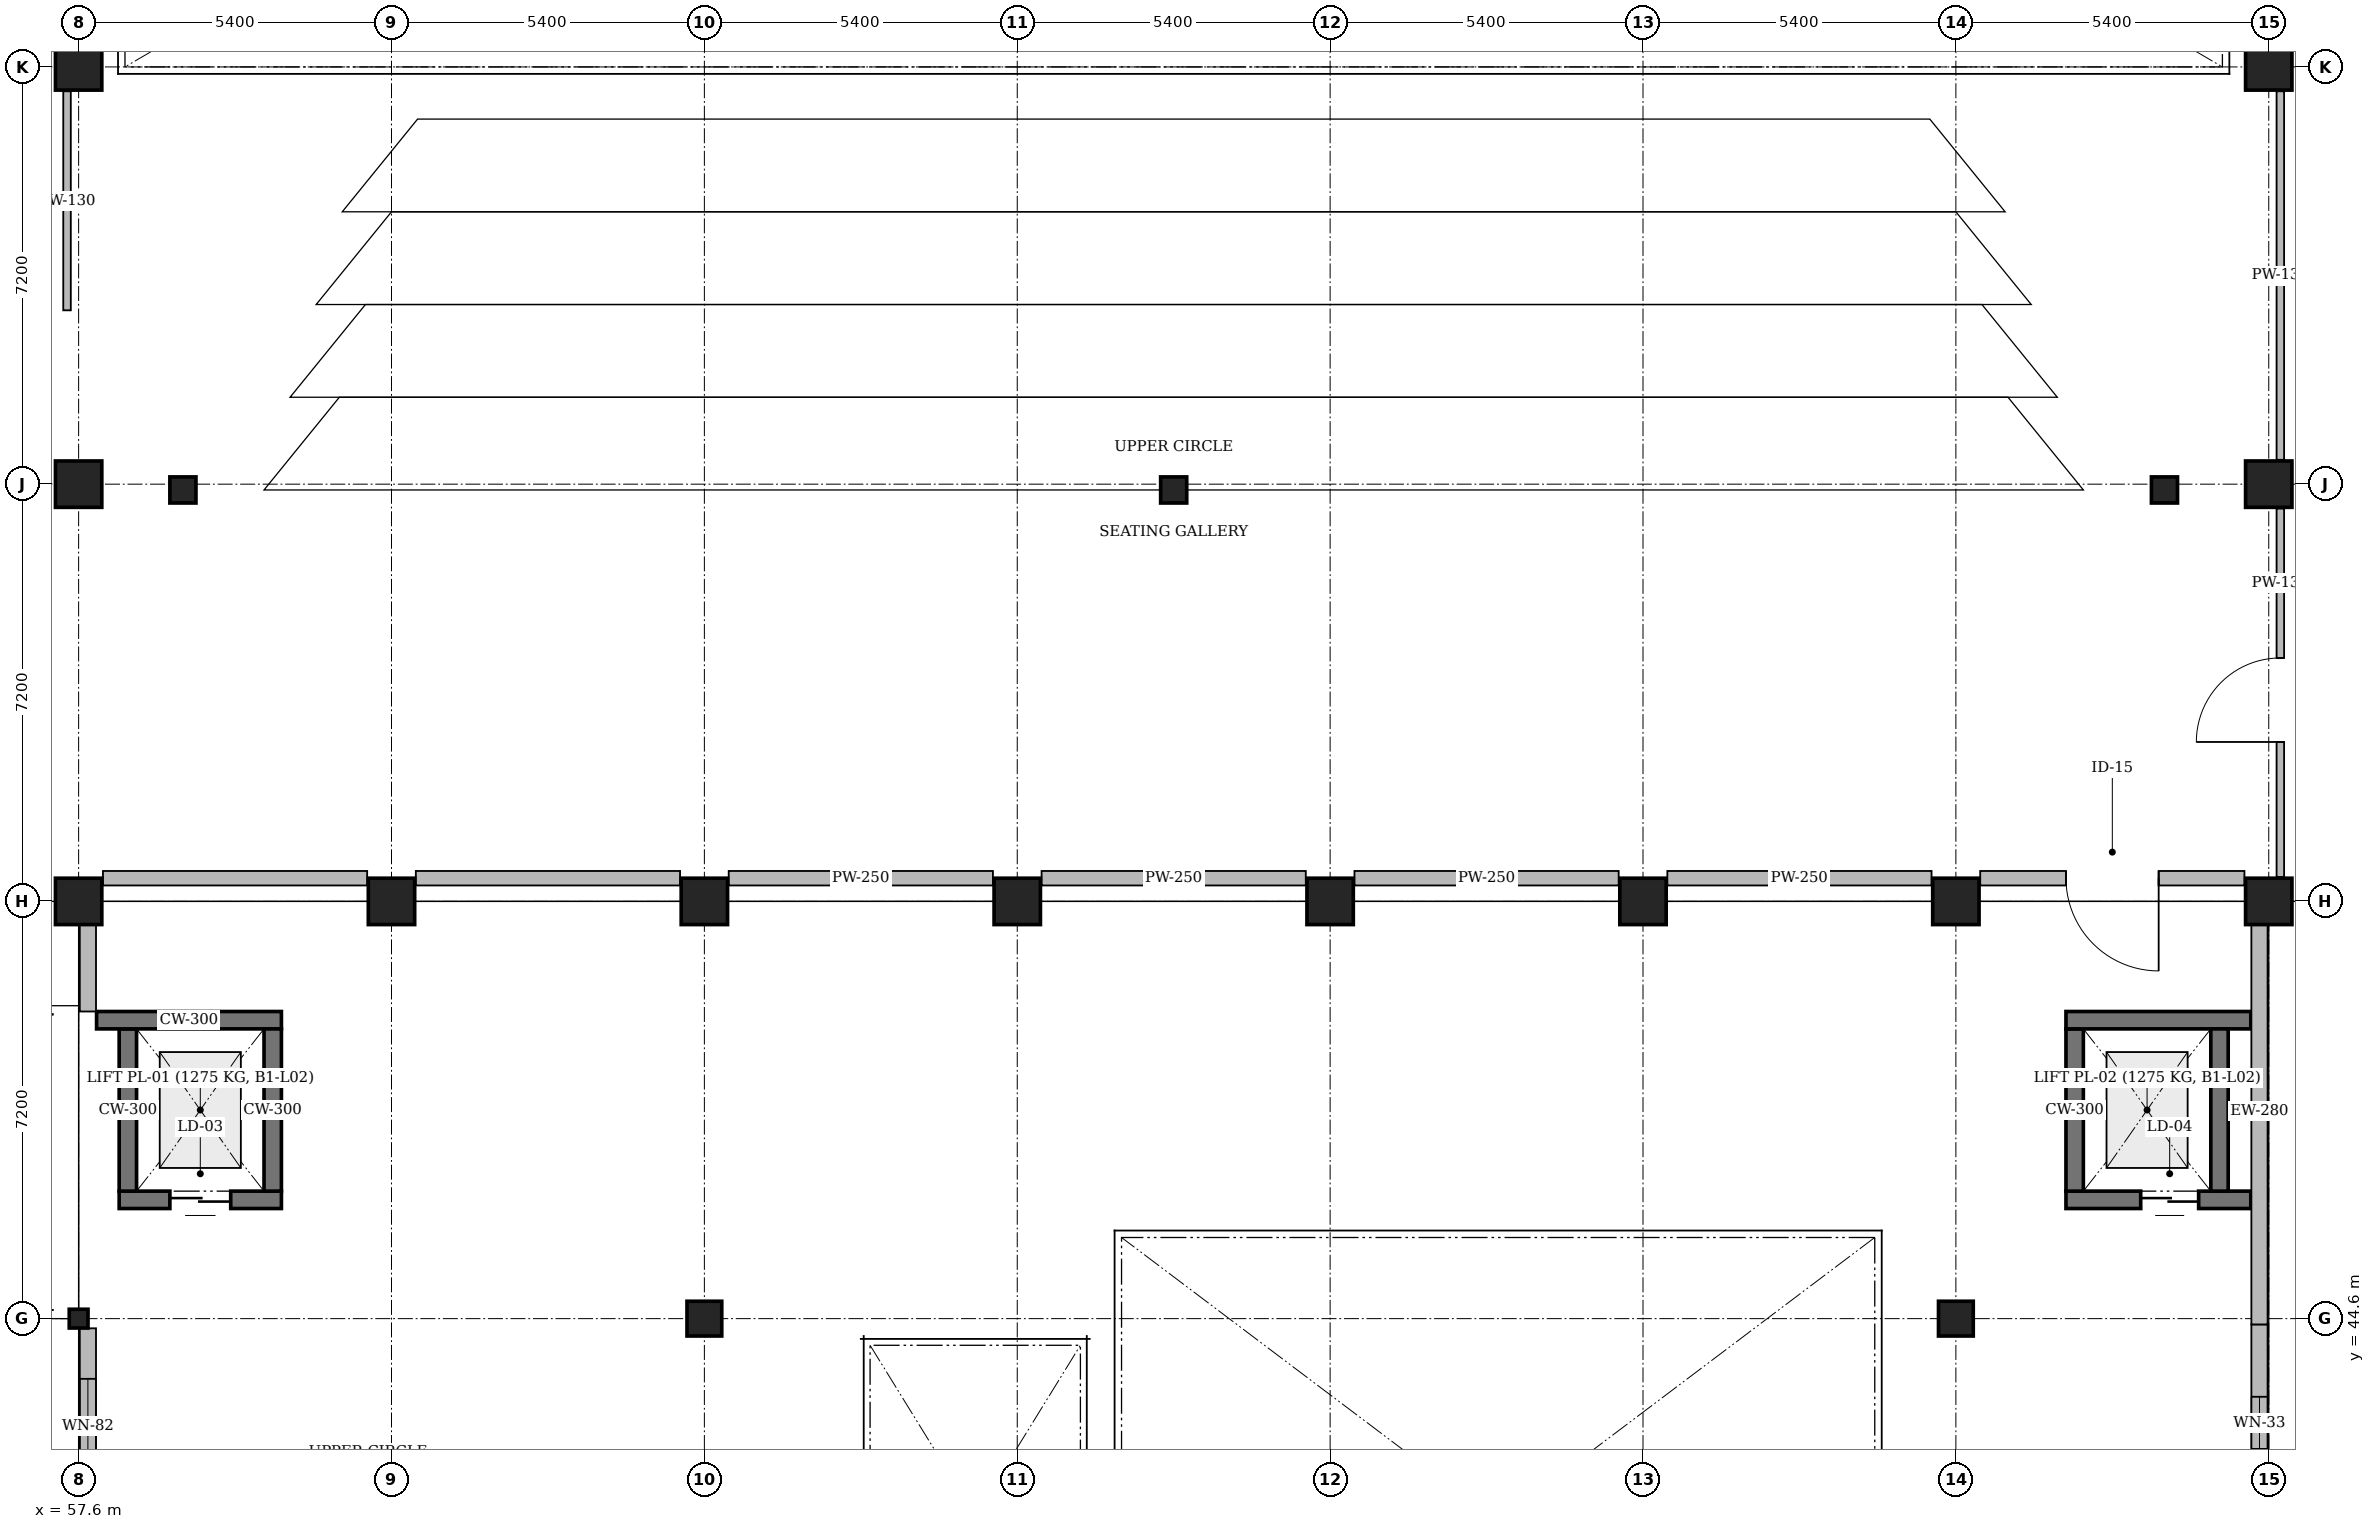
"""IFC4 building model, lengths in metres.
Left out: names, types, materials, properties, quantities, classifications, styles, units other than length and angle.
Written with IfcOpenShell. Run it as: python <this file> out.ifc"""

import sys

from ifc_helpers import new_model, si_unit, direction, frame, frame_2d, origin, origin_2d, place, context, subcontext, project, spatial, rectangle, circle, hollow_circle, extrude, element, fill, save


model = new_model("IFC4")
c1 = context("Model", 3, precision=1e-05, world=origin(), true_north=direction((0.0, 1.0)))
c2 = subcontext(c1, "Body", "Model", "MODEL_VIEW")
j1 = project(units=[si_unit("LENGTHUNIT", "METRE"), si_unit("PLANEANGLEUNIT", "RADIAN")], contexts=[c1])
p1 = place(None, origin())
s1 = spatial("IfcSite", under=j1, at=p1, CompositionType="ELEMENT")
p2 = place(p1, origin())
s2 = spatial("IfcBuilding", under=s1, at=p2, CompositionType="ELEMENT")
p3 = place(p2, frame((0.0, 0.0, 9.0)))
s3 = spatial("IfcBuildingStorey", under=s2, at=p3, CompositionType="ELEMENT", Elevation=9.0)
p4 = place(p3, frame((68.4, 44.6, 0.0), z_axis=(0.0, 0.0, 1.0), x_axis=(1.0, 0.0, 0.0)))
e1 = element("IfcColumn", 1, at=p4, inside=s3, PredefinedType="COLUMN", context=c2, shape_type="SweptSolid", body=[
    extrude(circle(Radius=0.3, at=origin_2d()), origin(), (0.0, 0.0, 1.0), 4.2),
])
for number, where, z_axis, x_axis in (
    (2, (68.4, 51.8, 0.0), (0.0, 0.0, 1.0), (1.0, 0.0, 0.0)),
    (3, (73.8, 51.8, 0.0), (0.0, 0.0, 1.0), (1.0, 0.0, 0.0)),
    (4, (79.2, 51.8, 0.0), (0.0, 0.0, 1.0), (1.0, 0.0, 0.0)),
    (5, (84.6, 51.8, 0.0), (0.0, 0.0, 1.0), (1.0, 0.0, 0.0)),
):
    element("IfcColumn", number, at=place(p3, frame(where, z_axis=z_axis, x_axis=x_axis)), inside=s3, PredefinedType="COLUMN", context=c2, shape_type="SweptSolid", body=[
        extrude(rectangle(XDim=0.8, YDim=0.8, at=origin_2d()), origin(), (0.0, 0.0, 1.0), 4.2),
    ])
p5 = place(p3, frame((90.0, 44.6, 0.0), z_axis=(0.0, 0.0, 1.0), x_axis=(1.0, 0.0, 0.0)))
e6 = element("IfcColumn", 6, at=p5, inside=s3, PredefinedType="COLUMN", context=c2, shape_type="SweptSolid", body=[
    extrude(circle(Radius=0.3, at=origin_2d()), origin(), (0.0, 0.0, 1.0), 4.2),
])
for number, where, z_axis, x_axis in (
    (7, (90.0, 51.8, 0.0), (0.0, 0.0, 1.0), (1.0, 0.0, 0.0)),
    (8, (95.4, 51.8, 0.0), (0.0, 0.0, 1.0), (1.0, 0.0, 0.0)),
    (9, (95.4, 59.0, 0.0), (0.0, 0.0, 1.0), (1.0, 0.0, 0.0)),
    (10, (95.4, 66.2, 0.0), (0.0, 0.0, 1.0), (1.0, 0.0, 0.0)),
):
    element("IfcColumn", number, at=place(p3, frame(where, z_axis=z_axis, x_axis=x_axis)), inside=s3, PredefinedType="COLUMN", context=c2, shape_type="SweptSolid", body=[
        extrude(rectangle(XDim=0.8, YDim=0.8, at=origin_2d()), origin(), (0.0, 0.0, 1.0), 4.2),
    ])
p6 = place(p3, frame((57.6, 44.6, 0.0), z_axis=(0.0, 0.0, 1.0), x_axis=(1.0, 0.0, 0.0)))
e11 = element("IfcColumn", 11, at=p6, inside=s3, PredefinedType="COLUMN", context=c2, shape_type="SweptSolid", body=[
    extrude(hollow_circle(Radius=0.162, WallThickness=0.012, at=origin_2d()), origin(), (0.0, 0.0, 1.0), 4.2),
])
for number, where, z_axis, x_axis in (
    (12, (57.6, 51.8, 0.0), (0.0, 0.0, 1.0), (1.0, 0.0, 0.0)),
    (13, (57.6, 59.0, 0.0), (0.0, 0.0, 1.0), (1.0, 0.0, 0.0)),
    (14, (57.6, 66.2, 0.0), (0.0, 0.0, 1.0), (1.0, 0.0, 0.0)),
    (15, (63.0, 51.8, 0.0), (0.0, 0.0, 1.0), (1.0, 0.0, 0.0)),
):
    element("IfcColumn", number, at=place(p3, frame(where, z_axis=z_axis, x_axis=x_axis)), inside=s3, PredefinedType="COLUMN", context=c2, shape_type="SweptSolid", body=[
        extrude(rectangle(XDim=0.8, YDim=0.8, at=origin_2d()), origin(), (0.0, 0.0, 1.0), 4.2),
    ])
for number, where, z_axis, x_axis in (
    (16, (59.4, 58.9, 0.0), (0.0, 0.0, 1.0), (1.0, 0.0, 0.0)),
    (17, (76.5, 58.9, 0.0), (0.0, 0.0, 1.0), (1.0, 0.0, 0.0)),
    (18, (93.6, 58.9, 0.0), (0.0, 0.0, 1.0), (1.0, 0.0, 0.0)),
):
    element("IfcColumn", number, at=place(p3, frame(where, z_axis=z_axis, x_axis=x_axis)), inside=s3, PredefinedType="COLUMN", context=c2, shape_type="SweptSolid", body=[
        extrude(rectangle(XDim=0.45, YDim=0.45, at=origin_2d()), origin(), (0.0, 0.0, 1.0), 1.05),
    ])
p7 = place(p3, frame((61.1, 46.65, 0.0), z_axis=(0.0, 0.0, 1.0), x_axis=(-1.0, 0.0, 0.0)))
e19 = element("IfcWall", 19, at=p7, inside=s3, PredefinedType="SOLIDWALL", context=c2, shape_type="SweptSolid", body=[
    extrude(rectangle(XDim=2.8, YDim=0.3, at=frame_2d((1.4, 0.0))), origin(), (0.0, 0.0, 1.0), 4.5),
])
p8 = place(p7, frame((0.875, 0.0, 0.0)))
e20 = element("IfcOpeningElement", 20, at=p8, cuts=e19, PredefinedType="OPENING", context=c2, shape_type="SweptSolid", body=[
    extrude(rectangle(XDim=1.05, YDim=2.1, at=frame_2d((0.525, 1.05))), frame((0.0, 0.17, 0.0), z_axis=(0.0, -1.0, 0.0), x_axis=(1.0, 0.0, 0.0)), (0.0, 0.0, 1.0), 0.34),
])
p9 = place(p3, frame((58.45, 46.8, 0.0), z_axis=(0.0, 0.0, 1.0), x_axis=(0.0, 1.0, 0.0)))
e21 = element("IfcWall", 21, at=p9, inside=s3, PredefinedType="SOLIDWALL", context=c2, shape_type="SweptSolid", body=[
    extrude(rectangle(XDim=2.8, YDim=0.3, at=frame_2d((1.4, 0.0))), origin(), (0.0, 0.0, 1.0), 4.5),
])
p10 = place(p3, frame((57.91, 49.75, 0.0), z_axis=(0.0, 0.0, 1.0), x_axis=(1.0, 0.0, 0.0)))
e22 = element("IfcWall", 22, at=p10, inside=s3, PredefinedType="SOLIDWALL", context=c2, shape_type="SweptSolid", body=[
    extrude(rectangle(XDim=3.19, YDim=0.3, at=frame_2d((1.595, 0.0))), origin(), (0.0, 0.0, 1.0), 4.5),
])
p11 = place(p3, frame((60.95, 49.6, 0.0), z_axis=(0.0, 0.0, 1.0), x_axis=(0.0, -1.0, 0.0)))
e23 = element("IfcWall", 23, at=p11, inside=s3, PredefinedType="SOLIDWALL", context=c2, shape_type="SweptSolid", body=[
    extrude(rectangle(XDim=2.8, YDim=0.3, at=frame_2d((1.4, 0.0))), origin(), (0.0, 0.0, 1.0), 4.5),
])
p12 = place(p3, frame((95.09, 46.65, 0.0), z_axis=(0.0, 0.0, 1.0), x_axis=(-1.0, 0.0, 0.0)))
e24 = element("IfcWall", 24, at=p12, inside=s3, PredefinedType="SOLIDWALL", context=c2, shape_type="SweptSolid", body=[
    extrude(rectangle(XDim=3.19, YDim=0.3, at=frame_2d((1.595, 0.0))), origin(), (0.0, 0.0, 1.0), 4.5),
])
p13 = place(p12, frame((0.9, 0.0, 0.0)))
e25 = element("IfcOpeningElement", 25, at=p13, cuts=e24, PredefinedType="OPENING", context=c2, shape_type="SweptSolid", body=[
    extrude(rectangle(XDim=1.0, YDim=2.1, at=frame_2d((0.5, 1.05))), frame((0.0, 0.17, 0.0), z_axis=(0.0, -1.0, 0.0), x_axis=(1.0, 0.0, 0.0)), (0.0, 0.0, 1.0), 0.34),
])
p14 = place(p3, frame((92.05, 46.8, 0.0), z_axis=(0.0, 0.0, 1.0), x_axis=(0.0, 1.0, 0.0)))
e26 = element("IfcWall", 26, at=p14, inside=s3, PredefinedType="SOLIDWALL", context=c2, shape_type="SweptSolid", body=[
    extrude(rectangle(XDim=2.8, YDim=0.3, at=frame_2d((1.4, 0.0))), origin(), (0.0, 0.0, 1.0), 4.5),
])
p15 = place(p3, frame((91.9, 49.75, 0.0), z_axis=(0.0, 0.0, 1.0), x_axis=(1.0, 0.0, 0.0)))
e27 = element("IfcWall", 27, at=p15, inside=s3, PredefinedType="SOLIDWALL", context=c2, shape_type="SweptSolid", body=[
    extrude(rectangle(XDim=3.19, YDim=0.3, at=frame_2d((1.595, 0.0))), origin(), (0.0, 0.0, 1.0), 4.5),
])
p16 = place(p3, frame((94.55, 49.6, 0.0), z_axis=(0.0, 0.0, 1.0), x_axis=(0.0, -1.0, 0.0)))
e28 = element("IfcWall", 28, at=p16, inside=s3, PredefinedType="SOLIDWALL", context=c2, shape_type="SweptSolid", body=[
    extrude(rectangle(XDim=2.8, YDim=0.3, at=frame_2d((1.4, 0.0))), origin(), (0.0, 0.0, 1.0), 4.5),
])
p17 = place(p3, frame((57.76, 37.705, 0.0), z_axis=(0.0, 0.0, 1.0), x_axis=(0.0, 1.0, 0.0)))
e29 = element("IfcWall", 29, at=p17, inside=s3, PredefinedType="SOLIDWALL", context=c2, shape_type="SweptSolid", body=[
    extrude(rectangle(XDim=6.728, YDim=0.28, at=frame_2d((3.364, 0.0))), origin(), (0.0, 0.0, 1.0), 3.673),
])
p18 = place(p17, frame((0.872, 0.0, 0.95)))
e30 = element("IfcOpeningElement", 30, at=p18, cuts=e29, PredefinedType="OPENING", context=c2, shape_type="SweptSolid", body=[
    extrude(rectangle(XDim=1.62, YDim=2.0, at=frame_2d((0.81, 1.0))), frame((0.0, 0.16, 0.0), z_axis=(0.0, -1.0, 0.0), x_axis=(1.0, 0.0, 0.0)), (0.0, 0.0, 1.0), 0.32),
])
p19 = place(p17, frame((4.236, 0.0, 0.95)))
e31 = element("IfcOpeningElement", 31, at=p19, cuts=e29, PredefinedType="OPENING", context=c2, shape_type="SweptSolid", body=[
    extrude(rectangle(XDim=1.62, YDim=2.0, at=frame_2d((0.81, 1.0))), frame((0.0, 0.16, 0.0), z_axis=(0.0, -1.0, 0.0), x_axis=(1.0, 0.0, 0.0)), (0.0, 0.0, 1.0), 0.32),
])
p20 = place(p3, frame((95.24, 37.705, 0.0), z_axis=(0.0, 0.0, 1.0), x_axis=(0.0, 1.0, 0.0)))
e32 = element("IfcWall", 32, at=p20, inside=s3, PredefinedType="SOLIDWALL", context=c2, shape_type="SweptSolid", body=[
    extrude(rectangle(XDim=6.795, YDim=0.28, at=frame_2d((3.397, 0.0))), origin(), (0.0, 0.0, 1.0), 3.383),
])
p21 = place(p20, frame((1.249, 0.0, 0.95)))
e33 = element("IfcOpeningElement", 33, at=p21, cuts=e32, PredefinedType="OPENING", context=c2, shape_type="SweptSolid", body=[
    extrude(rectangle(XDim=0.9, YDim=1.55, at=frame_2d((0.45, 0.775))), frame((0.0, 0.16, 0.0), z_axis=(0.0, -1.0, 0.0), x_axis=(1.0, 0.0, 0.0)), (0.0, 0.0, 1.0), 0.32),
])
p22 = place(p20, frame((4.646, 0.0, 0.95)))
e34 = element("IfcOpeningElement", 34, at=p22, cuts=e32, PredefinedType="OPENING", context=c2, shape_type="SweptSolid", body=[
    extrude(rectangle(XDim=0.9, YDim=1.55, at=frame_2d((0.45, 0.775))), frame((0.0, 0.16, 0.0), z_axis=(0.0, -1.0, 0.0), x_axis=(1.0, 0.0, 0.0)), (0.0, 0.0, 1.0), 0.32),
])
p23 = place(p3, frame((57.76, 49.9, 0.0), z_axis=(0.0, 0.0, 1.0), x_axis=(0.0, 1.0, 0.0)))
e35 = element("IfcWall", 35, at=p23, inside=s3, PredefinedType="SOLIDWALL", context=c2, shape_type="SweptSolid", body=[
    extrude(rectangle(XDim=1.95, YDim=0.28, at=frame_2d((0.975, 0.0))), origin(), (0.0, 0.0, 1.0), 3.573),
])
p24 = place(p3, frame((95.24, 44.5, 0.0), z_axis=(0.0, 0.0, 1.0), x_axis=(0.0, 1.0, 0.0)))
e36 = element("IfcWall", 36, at=p24, inside=s3, PredefinedType="SOLIDWALL", context=c2, shape_type="SweptSolid", body=[
    extrude(rectangle(XDim=7.35, YDim=0.28, at=frame_2d((3.675, 0.0))), origin(), (0.0, 0.0, 1.0), 0.785),
])
p25 = place(p3, frame((94.98, 52.2, 0.0), z_axis=(0.0, 0.0, 1.0), x_axis=(-1.0, 0.0, 0.0)))
e37 = element("IfcWall", 37, at=p25, inside=s3, PredefinedType="PARTITIONING", context=c2, shape_type="SweptSolid", body=[
    extrude(rectangle(XDim=4.56, YDim=0.25, at=frame_2d((2.28, 0.0))), origin(), (0.0, 0.0, 1.0), 3.95),
])
p26 = place(p25, frame((1.48, 0.0, 0.0)))
e38 = element("IfcOpeningElement", 38, at=p26, cuts=e37, PredefinedType="OPENING", context=c2, shape_type="SweptSolid", body=[
    extrude(rectangle(XDim=1.6, YDim=2.25, at=frame_2d((0.8, 1.125))), frame((0.0, 0.145, 0.0), z_axis=(0.0, -1.0, 0.0), x_axis=(1.0, 0.0, 0.0)), (0.0, 0.0, 1.0), 0.29),
])
p27 = place(p3, frame((89.58, 52.2, 0.0), z_axis=(0.0, 0.0, 1.0), x_axis=(-1.0, 0.0, 0.0)))
e39 = element("IfcWall", 39, at=p27, inside=s3, PredefinedType="PARTITIONING", context=c2, shape_type="SweptSolid", body=[
    extrude(rectangle(XDim=4.56, YDim=0.25, at=frame_2d((2.28, 0.0))), origin(), (0.0, 0.0, 1.0), 3.95),
])
p28 = place(p3, frame((84.18, 52.2, 0.0), z_axis=(0.0, 0.0, 1.0), x_axis=(-1.0, 0.0, 0.0)))
e40 = element("IfcWall", 40, at=p28, inside=s3, PredefinedType="PARTITIONING", context=c2, shape_type="SweptSolid", body=[
    extrude(rectangle(XDim=4.56, YDim=0.25, at=frame_2d((2.28, 0.0))), origin(), (0.0, 0.0, 1.0), 3.95),
])
p29 = place(p3, frame((78.78, 52.2, 0.0), z_axis=(0.0, 0.0, 1.0), x_axis=(-1.0, 0.0, 0.0)))
e41 = element("IfcWall", 41, at=p29, inside=s3, PredefinedType="PARTITIONING", context=c2, shape_type="SweptSolid", body=[
    extrude(rectangle(XDim=4.56, YDim=0.25, at=frame_2d((2.28, 0.0))), origin(), (0.0, 0.0, 1.0), 3.95),
])
p30 = place(p3, frame((73.38, 52.2, 0.0), z_axis=(0.0, 0.0, 1.0), x_axis=(-1.0, 0.0, 0.0)))
e42 = element("IfcWall", 42, at=p30, inside=s3, PredefinedType="PARTITIONING", context=c2, shape_type="SweptSolid", body=[
    extrude(rectangle(XDim=4.56, YDim=0.25, at=frame_2d((2.28, 0.0))), origin(), (0.0, 0.0, 1.0), 3.95),
])
for number, where, z_axis, x_axis in (
    (43, (67.98, 52.2, 0.0), (0.0, 0.0, 1.0), (-1.0, 0.0, 0.0)),
    (44, (62.58, 52.2, 0.0), (0.0, 0.0, 1.0), (-1.0, 0.0, 0.0)),
):
    element("IfcWall", number, at=place(p3, frame(where, z_axis=z_axis, x_axis=x_axis)), inside=s3, PredefinedType="PARTITIONING", context=c2, shape_type="SweptSolid", body=[
        extrude(rectangle(XDim=4.56, YDim=0.25, at=frame_2d((2.28, 0.0))), origin(), (0.0, 0.0, 1.0), 3.95),
    ])
p31 = place(p3, frame((57.4, 65.78, 0.0), z_axis=(0.0, 0.0, 1.0), x_axis=(0.0, -1.0, 0.0)))
e45 = element("IfcWall", 45, at=p31, inside=s3, PredefinedType="PARTITIONING", context=c2, shape_type="SweptSolid", body=[
    extrude(rectangle(XDim=3.78, YDim=0.13, at=frame_2d((1.89, 0.0))), origin(), (0.0, 0.0, 1.0), 3.65),
])
p32 = place(p3, frame((95.6, 52.22, 0.0), z_axis=(0.0, 0.0, 1.0), x_axis=(0.0, 1.0, 0.0)))
e46 = element("IfcWall", 46, at=p32, inside=s3, PredefinedType="PARTITIONING", context=c2, shape_type="SweptSolid", body=[
    extrude(rectangle(XDim=6.36, YDim=0.13, at=frame_2d((3.18, 0.0))), origin(), (0.0, 0.0, 1.0), 3.56),
])
p33 = place(p32, frame((2.331, 0.0, 0.0)))
e47 = element("IfcOpeningElement", 47, at=p33, cuts=e46, PredefinedType="OPENING", context=c2, shape_type="SweptSolid", body=[
    extrude(rectangle(XDim=1.45, YDim=2.2, at=frame_2d((0.725, 1.1))), frame((0.0, 0.085, 0.0), z_axis=(0.0, -1.0, 0.0), x_axis=(1.0, 0.0, 0.0)), (0.0, 0.0, 1.0), 0.17),
])
p34 = place(p3, frame((95.6, 59.42, 0.0), z_axis=(0.0, 0.0, 1.0), x_axis=(0.0, 1.0, 0.0)))
e48 = element("IfcWall", 48, at=p34, inside=s3, PredefinedType="PARTITIONING", context=c2, shape_type="SweptSolid", body=[
    extrude(rectangle(XDim=6.36, YDim=0.13, at=frame_2d((3.18, 0.0))), origin(), (0.0, 0.0, 1.0), 3.65),
])
p35 = place(p8, origin())
e49 = element("IfcDoor", 49, at=p35, inside=s3, OperationType="DOUBLE_DOOR_SLIDING", PredefinedType="DOOR", context=c2, shape_type="SweptSolid", body=[
    extrude(rectangle(XDim=1.05, YDim=2.1, at=frame_2d((0.525, 1.05))), frame((0.0, 0.025, 0.0), z_axis=(0.0, -1.0, 0.0), x_axis=(1.0, 0.0, 0.0)), (0.0, 0.0, 1.0), 0.05),
])
fill(e20, e49)
p36 = place(p13, origin())
e50 = element("IfcDoor", 50, at=p36, inside=s3, OperationType="DOUBLE_DOOR_SLIDING", PredefinedType="DOOR", context=c2, shape_type="SweptSolid", body=[
    extrude(rectangle(XDim=1.0, YDim=2.1, at=frame_2d((0.5, 1.05))), frame((0.0, 0.025, 0.0), z_axis=(0.0, -1.0, 0.0), x_axis=(1.0, 0.0, 0.0)), (0.0, 0.0, 1.0), 0.05),
])
fill(e25, e50)
p37 = place(p19, origin())
e51 = element("IfcWindow", 51, at=p37, inside=s3, PartitioningType="SINGLE_PANEL", PredefinedType="WINDOW", context=c2, shape_type="SweptSolid", body=[
    extrude(rectangle(XDim=1.62, YDim=2.0, at=frame_2d((0.81, 1.0))), frame((0.0, 0.03, 0.0), z_axis=(0.0, -1.0, 0.0), x_axis=(1.0, 0.0, 0.0)), (0.0, 0.0, 1.0), 0.06),
])
fill(e31, e51)
p38 = place(p22, origin())
e52 = element("IfcWindow", 52, at=p38, inside=s3, PartitioningType="SINGLE_PANEL", PredefinedType="WINDOW", context=c2, shape_type="SweptSolid", body=[
    extrude(rectangle(XDim=0.9, YDim=1.55, at=frame_2d((0.45, 0.775))), frame((0.0, 0.03, 0.0), z_axis=(0.0, -1.0, 0.0), x_axis=(1.0, 0.0, 0.0)), (0.0, 0.0, 1.0), 0.06),
])
fill(e34, e52)
p39 = place(p26, origin())
e53 = element("IfcDoor", 53, at=p39, inside=s3, OperationType="DOUBLE_DOOR_SINGLE_SWING", PredefinedType="DOOR", context=c2, shape_type="SweptSolid", body=[
    extrude(rectangle(XDim=1.6, YDim=2.25, at=frame_2d((0.8, 1.125))), frame((0.0, 0.025, 0.0), z_axis=(0.0, -1.0, 0.0), x_axis=(1.0, 0.0, 0.0)), (0.0, 0.0, 1.0), 0.05),
])
fill(e38, e53)
p40 = place(p33, origin())
e54 = element("IfcDoor", 54, at=p40, inside=s3, OperationType="DOUBLE_DOOR_SINGLE_SWING", PredefinedType="DOOR", context=c2, shape_type="SweptSolid", body=[
    extrude(rectangle(XDim=1.45, YDim=2.2, at=frame_2d((0.725, 1.1))), frame((0.0, 0.025, 0.0), z_axis=(0.0, -1.0, 0.0), x_axis=(1.0, 0.0, 0.0)), (0.0, 0.0, 1.0), 0.05),
])
fill(e47, e54)
save(model, sys.argv[1])
